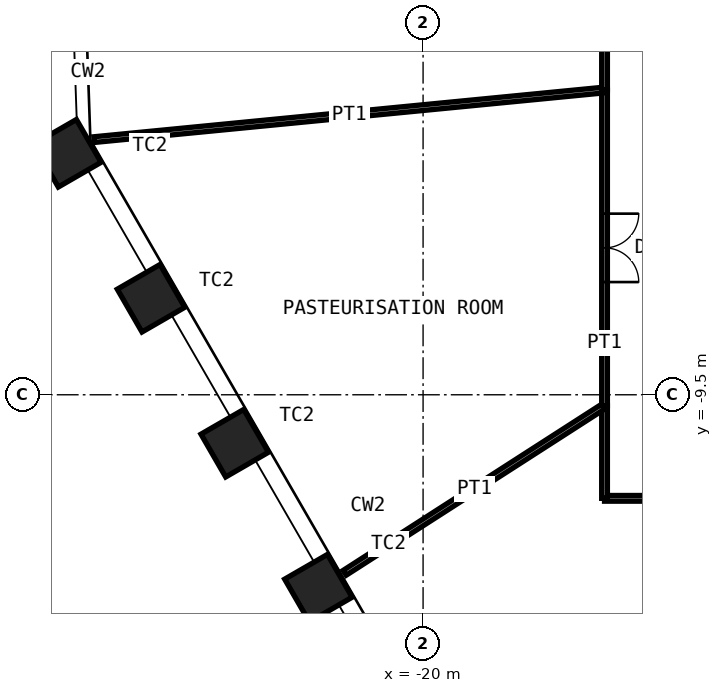
"""IFC4 building model, lengths in metres.
Left out: names, types, materials, properties, quantities, classifications, styles, units other than length and angle.
Written with IfcOpenShell. Run it as: python <this file> out.ifc"""

import sys

from ifc_helpers import new_model, si_unit, direction, frame, frame_2d, origin, origin_2d, place, context, subcontext, project, spatial, rectangle, hollow_rectangle, extrude, element, fill, save


model = new_model("IFC4")
c1 = context("Model", 3, precision=1e-05, world=origin(), true_north=direction((0.0, 1.0)))
c2 = subcontext(c1, "Body", "Model", "MODEL_VIEW")
j1 = project(units=[si_unit("LENGTHUNIT", "METRE"), si_unit("PLANEANGLEUNIT", "RADIAN")], contexts=[c1])
p1 = place(None, origin())
s1 = spatial("IfcSite", under=j1, at=p1, CompositionType="ELEMENT")
p2 = place(p1, origin())
s2 = spatial("IfcBuilding", under=s1, at=p2, CompositionType="ELEMENT")
p3 = place(p2, frame((0.0, 0.0, 67.0)))
s3 = spatial("IfcBuildingStorey", under=s2, at=p3, CompositionType="ELEMENT", Elevation=67.0)
for number, where, z_axis, x_axis in (
    (1, (-22.754, -14.589, 0.0), (0.0, 0.0, 1.0), (0.5, -0.866, 0.0)),
    (2, (-24.956, -10.775, 0.0), (0.0, 0.0, 1.0), (0.5, -0.866, 0.0)),
    (3, (-27.158, -6.96, 0.0), (0.0, 0.0, 1.0), (0.5, -0.866, 0.0)),
    (4, (-29.361, -3.146, 0.0), (0.0, 0.0, 1.0), (0.5, -0.866, 0.0)),
):
    element("IfcColumn", number, at=place(p3, frame(where, z_axis=z_axis, x_axis=x_axis)), inside=s3, PredefinedType="COLUMN", context=c2, shape_type="SweptSolid", body=[
        extrude(hollow_rectangle(XDim=1.3, YDim=1.3, WallThickness=0.1, at=origin_2d()), origin(), (0.0, 0.0, 1.0), 5.0),
    ])
p4 = place(p3, frame((-5.654, -12.225, 0.0), z_axis=(0.0, 0.0, 1.0), x_axis=(-1.0, 0.0, 0.0)))
e5 = element("IfcWall", 5, at=p4, inside=s3, PredefinedType="PARTITIONING", context=c2, shape_type="SweptSolid", body=[
    extrude(rectangle(XDim=9.571, YDim=0.15, at=frame_2d((4.785, 0.0))), origin(), (0.0, 0.0, 1.0), 4.8),
])
p5 = place(p4, frame((3.885, 0.0, 0.0)))
e6 = element("IfcOpeningElement", 6, at=p5, cuts=e5, PredefinedType="OPENING", context=c2, shape_type="SweptSolid", body=[
    extrude(rectangle(XDim=1.8, YDim=2.4, at=frame_2d((0.9, 1.2))), frame((0.0, 0.085, 0.0), z_axis=(0.0, -1.0, 0.0), x_axis=(1.0, 0.0, 0.0)), (0.0, 0.0, 1.0), 0.17),
])
p6 = place(p3, frame((-15.225, -12.225, 0.0), z_axis=(0.0, 0.0, 1.0), x_axis=(0.0, 1.0, 0.0)))
e7 = element("IfcWall", 7, at=p6, inside=s3, PredefinedType="PARTITIONING", context=c2, shape_type="SweptSolid", body=[
    extrude(rectangle(XDim=2.437, YDim=0.15, at=frame_2d((1.218, 0.0))), origin(), (0.0, 0.0, 1.0), 4.8),
])
p7 = place(p3, frame((-22.063, -14.185, 0.0), z_axis=(0.0, 0.0, 1.0), x_axis=(0.8411570088, 0.540790982309, 0.0)))
e8 = element("IfcWall", 8, at=p7, inside=s3, PredefinedType="PARTITIONING", context=c2, shape_type="SweptSolid", body=[
    extrude(rectangle(XDim=8.13, YDim=0.15, at=frame_2d((4.065, 0.0))), origin(), (0.0, 0.0, 1.0), 3.7),
])
p8 = place(p3, frame((-15.225, -9.789, 0.0), z_axis=(0.0, 0.0, 1.0), x_axis=(0.0, 1.0, 0.0)))
e9 = element("IfcWall", 9, at=p8, inside=s3, PredefinedType="PARTITIONING", context=c2, shape_type="SweptSolid", body=[
    extrude(rectangle(XDim=8.308, YDim=0.15, at=frame_2d((4.154, 0.0))), origin(), (0.0, 0.0, 1.0), 4.8),
])
p9 = place(p8, frame((3.254, 0.0, 0.0)))
e10 = element("IfcOpeningElement", 10, at=p9, cuts=e9, PredefinedType="OPENING", context=c2, shape_type="SweptSolid", body=[
    extrude(rectangle(XDim=1.8, YDim=2.4, at=frame_2d((0.9, 1.2))), frame((0.0, 0.085, 0.0), z_axis=(0.0, -1.0, 0.0), x_axis=(1.0, 0.0, 0.0)), (0.0, 0.0, 1.0), 0.17),
])
p10 = place(p3, frame((-28.655, -2.786, 0.0), z_axis=(0.0, 0.0, 1.0), x_axis=(0.995307331187, 0.096764231438, 0.0)))
e11 = element("IfcWall", 11, at=p10, inside=s3, PredefinedType="PARTITIONING", context=c2, shape_type="SweptSolid", body=[
    extrude(rectangle(XDim=13.493, YDim=0.15, at=frame_2d((6.747, 0.0))), origin(), (0.0, 0.0, 1.0), 3.7),
])
p11 = place(p3, frame((-15.225, -1.48, 0.0), z_axis=(0.0, 0.0, 1.0), x_axis=(0.0, 1.0, 0.0)))
e12 = element("IfcWall", 12, at=p11, inside=s3, PredefinedType="PARTITIONING", context=c2, shape_type="SweptSolid", body=[
    extrude(rectangle(XDim=4.159, YDim=0.15, at=frame_2d((2.08, 0.0))), origin(), (0.0, 0.0, 1.0), 4.8),
])
p12 = place(p11, frame((1.58, 0.0, 0.0)))
e13 = element("IfcOpeningElement", 13, at=p12, cuts=e12, PredefinedType="OPENING", context=c2, shape_type="SweptSolid", body=[
    extrude(rectangle(XDim=1.0, YDim=2.4, at=frame_2d((0.5, 1.2))), frame((0.0, 0.085, 0.0), z_axis=(0.0, -1.0, 0.0), x_axis=(1.0, 0.0, 0.0)), (0.0, 0.0, 1.0), 0.17),
])
p13 = place(p9, origin())
e14 = element("IfcDoor", 14, at=p13, inside=s3, OperationType="DOUBLE_DOOR_DOUBLE_SWING", PredefinedType="DOOR", context=c2, shape_type="SweptSolid", body=[
    extrude(rectangle(XDim=1.8, YDim=2.4, at=frame_2d((0.9, 1.2))), frame((0.0, 0.025, 0.0), z_axis=(0.0, -1.0, 0.0), x_axis=(1.0, 0.0, 0.0)), (0.0, 0.0, 1.0), 0.05),
])
fill(e10, e14)
save(model, sys.argv[1])
